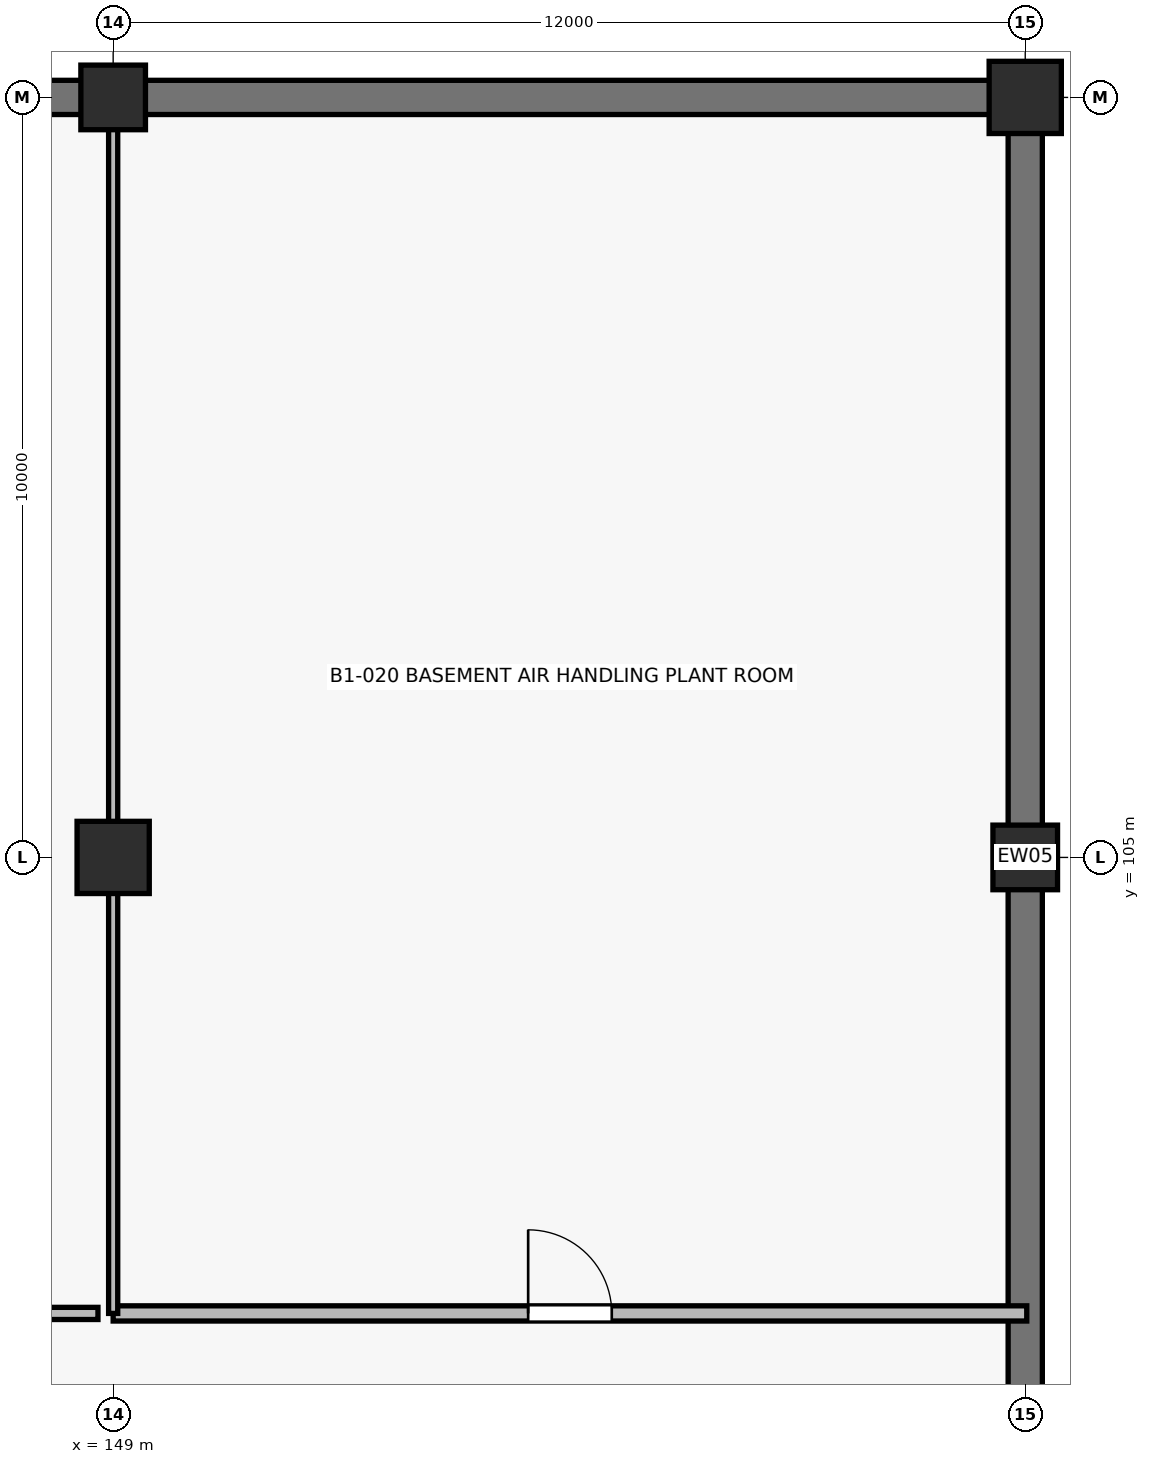
"""IFC4 building model, lengths in metres.
Left out: names, types, materials, properties, quantities, classifications, styles, units other than length and angle.
Written with IfcOpenShell. Run it as: python <this file> out.ifc"""

import sys

from ifc_helpers import new_model, si_unit, direction, frame, frame_2d, origin, origin_2d, place, context, subcontext, project, spatial, rectangle, extrude, element, fill, save


model = new_model("IFC4")
c1 = context("Model", 3, precision=1e-05, world=origin(), true_north=direction((0.0, 1.0)))
c2 = subcontext(c1, "Body", "Model", "MODEL_VIEW")
j1 = project(units=[si_unit("LENGTHUNIT", "METRE"), si_unit("PLANEANGLEUNIT", "RADIAN")], contexts=[c1])
p1 = place(None, origin())
s1 = spatial("IfcSite", under=j1, at=p1, CompositionType="ELEMENT")
p2 = place(p1, origin())
s2 = spatial("IfcBuilding", under=s1, at=p2, CompositionType="ELEMENT")
p3 = place(p2, frame((0.0, 0.0, -4.5)))
s3 = spatial("IfcBuildingStorey", under=s2, at=p3, CompositionType="ELEMENT", Elevation=-4.5)
p4 = place(p3, frame((149.0, 105.0, 0.0), z_axis=(0.0, 0.0, 1.0), x_axis=(1.0, 0.0, 0.0)))
e1 = element("IfcColumn", 1, at=p4, inside=s3, PredefinedType="COLUMN", context=c2, shape_type="SweptSolid", body=[
    extrude(rectangle(XDim=0.95, YDim=0.95, at=origin_2d()), origin(), (0.0, 0.0, 1.0), 4.5),
])
for number, where, z_axis, x_axis in (
    (2, (149.0, 115.0, 0.0), (0.0, 0.0, 1.0), (1.0, 0.0, 0.0)),
    (3, (161.0, 105.0, 0.0), (0.0, 0.0, 1.0), (1.0, 0.0, 0.0)),
):
    element("IfcColumn", number, at=place(p3, frame(where, z_axis=z_axis, x_axis=x_axis)), inside=s3, PredefinedType="COLUMN", context=c2, shape_type="SweptSolid", body=[
        extrude(rectangle(XDim=0.85, YDim=0.85, at=origin_2d()), origin(), (0.0, 0.0, 1.0), 4.5),
    ])
p5 = place(p3, frame((161.0, 115.0, 0.0), z_axis=(0.0, 0.0, 1.0), x_axis=(1.0, 0.0, 0.0)))
e4 = element("IfcColumn", 4, at=p5, inside=s3, PredefinedType="COLUMN", context=c2, shape_type="SweptSolid", body=[
    extrude(rectangle(XDim=0.95, YDim=0.95, at=origin_2d()), origin(), (0.0, 0.0, 1.0), 4.5),
])
p6 = place(p3, frame((43.0, 115.0, 0.0), z_axis=(0.0, 0.0, 1.0), x_axis=(1.0, 0.0, 0.0)))
e5 = element("IfcWall", 5, at=p6, inside=s3, PredefinedType="SOLIDWALL", context=c2, shape_type="SweptSolid", body=[
    extrude(rectangle(XDim=118.0, YDim=0.45, at=frame_2d((59.0, 0.0))), origin(), (0.0, 0.0, 1.0), 4.5),
])
p7 = place(p3, frame((161.0, 115.0, 0.0), z_axis=(0.0, 0.0, 1.0), x_axis=(0.0, -1.0, 0.0)))
e6 = element("IfcWall", 6, at=p7, inside=s3, PredefinedType="SOLIDWALL", context=c2, shape_type="SweptSolid", body=[
    extrude(rectangle(XDim=20.0, YDim=0.45, at=frame_2d((10.0, 0.0))), origin(), (0.0, 0.0, 1.0), 4.5),
])
p8 = place(p3, frame((137.4, 99.0, 0.0), z_axis=(0.0, 0.0, 1.0), x_axis=(1.0, 0.0, 0.0)))
e7 = element("IfcWall", 7, at=p8, inside=s3, PredefinedType="PARTITIONING", context=c2, shape_type="SweptSolid", body=[
    extrude(rectangle(XDim=11.4, YDim=0.16, at=frame_2d((5.7, 0.0))), origin(), (0.0, 0.0, 1.0), 3.275),
])
p9 = place(p8, frame((4.5, 0.0, 0.0)))
e8 = element("IfcOpeningElement", 8, at=p9, cuts=e7, PredefinedType="OPENING", context=c2, shape_type="SweptSolid", body=[
    extrude(rectangle(XDim=1.6, YDim=2.2, at=frame_2d((0.8, 1.1))), frame((0.0, 0.09, 0.0), z_axis=(0.0, -1.0, 0.0), x_axis=(1.0, 0.0, 0.0)), (0.0, 0.0, 1.0), 0.18),
])
p10 = place(p3, frame((149.0, 99.0, 0.0), z_axis=(0.0, 0.0, 1.0), x_axis=(1.0, 0.0, 0.0)))
e9 = element("IfcWall", 9, at=p10, inside=s3, PredefinedType="PARTITIONING", context=c2, shape_type="SweptSolid", body=[
    extrude(rectangle(XDim=12.02, YDim=0.2, at=frame_2d((6.01, 0.0))), origin(), (0.0, 0.0, 1.0), 3.275),
])
p11 = place(p10, frame((5.46, 0.0, 0.0)))
e10 = element("IfcOpeningElement", 10, at=p11, cuts=e9, PredefinedType="OPENING", context=c2, shape_type="SweptSolid", body=[
    extrude(rectangle(XDim=1.1, YDim=2.15, at=frame_2d((0.55, 1.075))), frame((0.0, 0.11, 0.0), z_axis=(0.0, -1.0, 0.0), x_axis=(1.0, 0.0, 0.0)), (0.0, 0.0, 1.0), 0.22),
])
p12 = place(p3, frame((149.0, 99.0, 0.0), z_axis=(0.0, 0.0, 1.0), x_axis=(0.0, 1.0, 0.0)))
e11 = element("IfcWall", 11, at=p12, inside=s3, PredefinedType="PARTITIONING", context=c2, shape_type="SweptSolid", body=[
    extrude(rectangle(XDim=15.75, YDim=0.12, at=frame_2d((7.875, 0.0))), origin(), (0.0, 0.0, 1.0), 3.175),
])
p13 = place(p11, origin())
e12 = element("IfcDoor", 12, at=p13, inside=s3, OperationType="SINGLE_SWING_LEFT", PredefinedType="DOOR", context=c2, shape_type="SweptSolid", body=[
    extrude(rectangle(XDim=1.1, YDim=2.15, at=frame_2d((0.55, 1.075))), frame((0.0, 0.025, 0.0), z_axis=(0.0, -1.0, 0.0), x_axis=(1.0, 0.0, 0.0)), (0.0, 0.0, 1.0), 0.05),
])
fill(e10, e12)
save(model, sys.argv[1])
